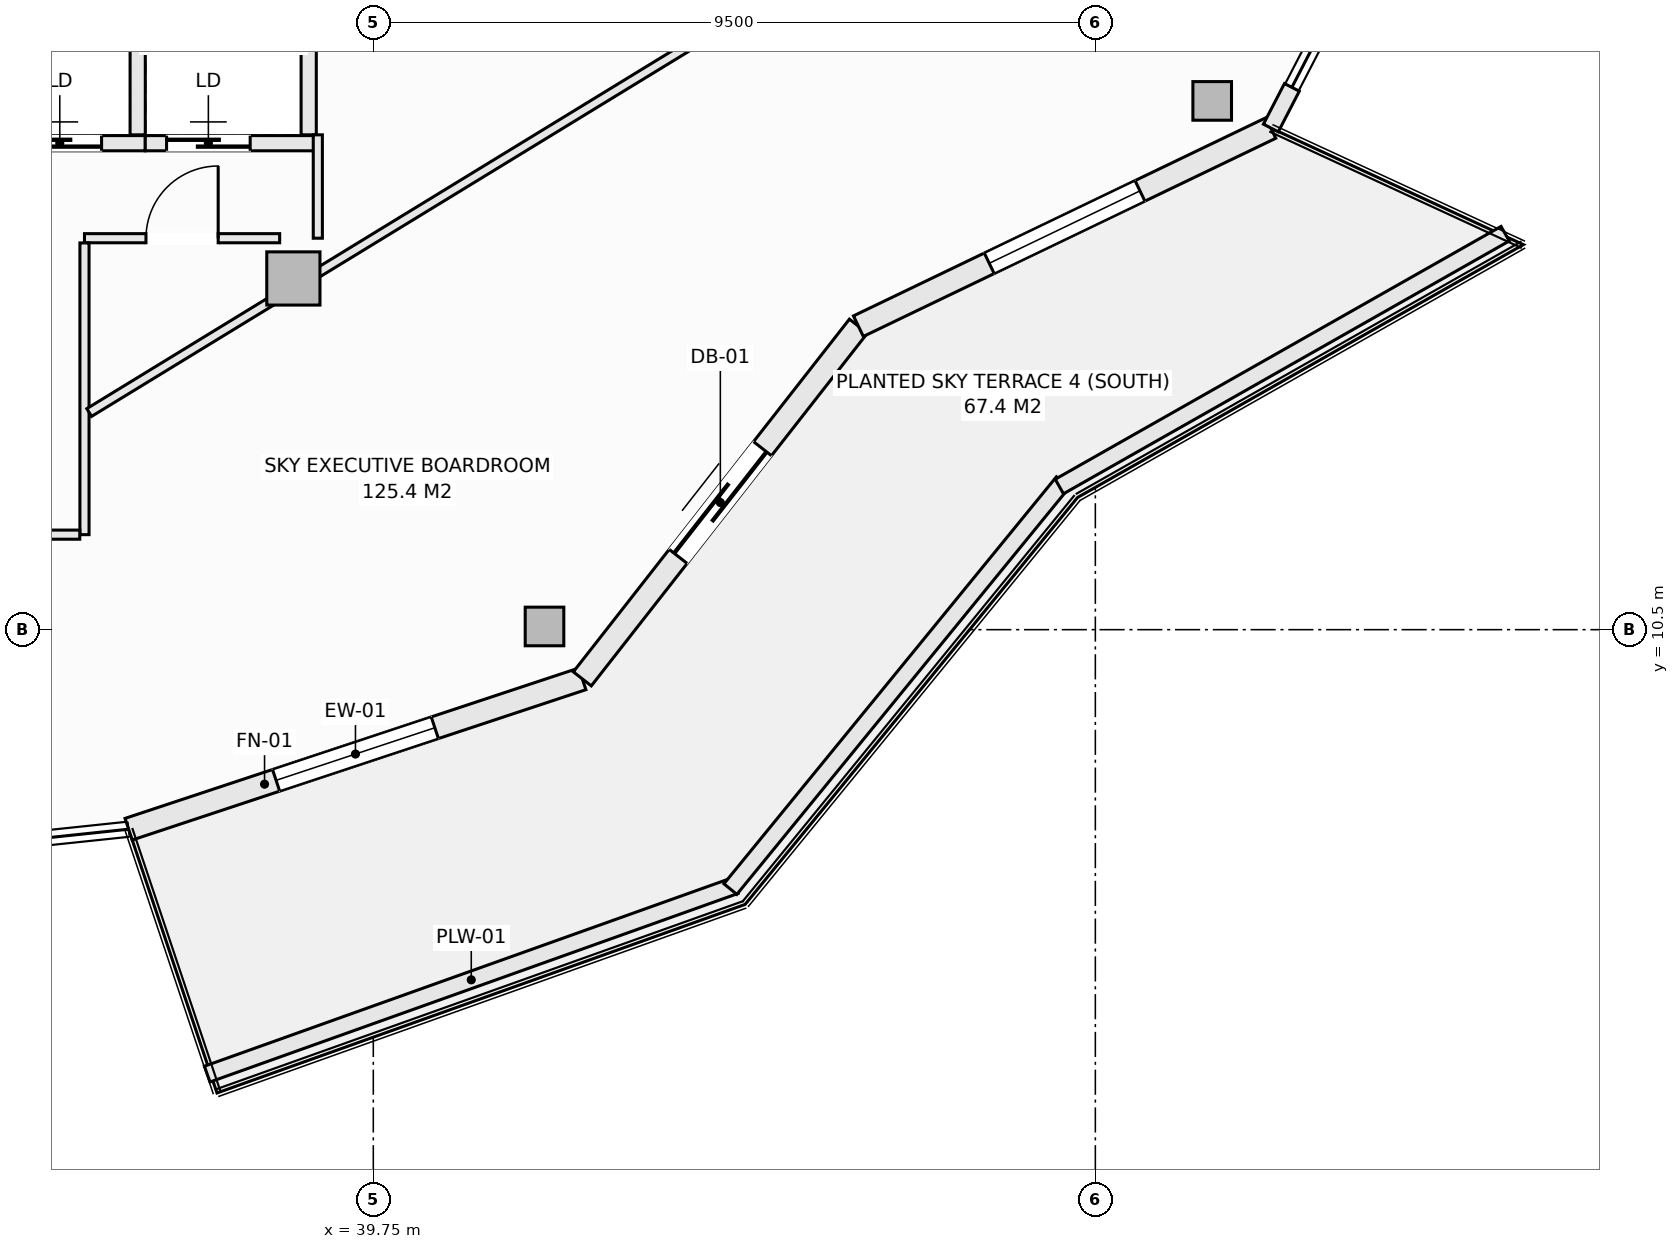
"""IFC4 building model, lengths in metres.
Left out: names, types, materials, properties, quantities, classifications, styles, units other than length and angle.
Written with IfcOpenShell. Run it as: python <this file> out.ifc"""

import sys

from ifc_helpers import new_model, si_unit, direction, frame, frame_2d, origin, origin_2d, place, context, subcontext, project, spatial, rectangle, hollow_rectangle, extrude, element, fill, save


model = new_model("IFC4")
c1 = context("Model", 3, precision=1e-05, world=origin(), true_north=direction((0.0, 1.0)))
c2 = subcontext(c1, "Body", "Model", "MODEL_VIEW")
j1 = project(units=[si_unit("LENGTHUNIT", "METRE"), si_unit("PLANEANGLEUNIT", "RADIAN")], contexts=[c1])
p1 = place(None, origin())
s1 = spatial("IfcSite", under=j1, at=p1, CompositionType="ELEMENT")
p2 = place(p1, origin())
s2 = spatial("IfcBuilding", under=s1, at=p2, CompositionType="ELEMENT")
p3 = place(p2, frame((0.0, 0.0, 191.9)))
s3 = spatial("IfcBuildingStorey", under=s2, at=p3, CompositionType="ELEMENT", Elevation=191.9)
for number, where, z_axis, x_axis in (
    (1, (42.003, 10.542, -0.28), (0.0, 0.0, 1.0), (1.0, 0.0, 0.0)),
    (2, (50.787, 17.456, -0.28), (0.0, 0.0, 1.0), (1.0, 0.0, 0.0)),
):
    element("IfcColumn", number, at=place(p3, frame(where, z_axis=z_axis, x_axis=x_axis)), inside=s3, PredefinedType="COLUMN", context=c2, shape_type="SweptSolid", body=[
        extrude(hollow_rectangle(XDim=0.508, YDim=0.508, WallThickness=0.019, at=origin_2d()), origin(), (0.0, 0.0, 1.0), 4.51),
    ])
p4 = place(p3, frame((38.698, 15.121, -0.28), z_axis=(0.0, 0.0, 1.0), x_axis=(1.0, 0.0, 0.0)))
e3 = element("IfcColumn", 3, at=p4, inside=s3, PredefinedType="COLUMN", context=c2, shape_type="SweptSolid", body=[
    extrude(rectangle(XDim=0.7, YDim=0.7, at=origin_2d()), origin(), (0.0, 0.0, 1.0), 4.51),
])
p5 = place(p3, frame((36.531, 7.875, 0.0), z_axis=(0.0, 0.0, 1.0), x_axis=(0.949240877604, 0.314550085495, 0.0)))
e4 = element("IfcWall", 4, at=p5, inside=s3, PredefinedType="SOLIDWALL", context=c2, shape_type="SweptSolid", body=[
    extrude(rectangle(XDim=6.288, YDim=0.3, at=frame_2d((3.144, 0.0))), origin(), (0.0, 0.0, 1.0), 3.805),
])
p6 = place(p5, frame((2.044, 0.0, 0.72)))
e5 = element("IfcOpeningElement", 5, at=p6, cuts=e4, PredefinedType="OPENING", context=c2, shape_type="SweptSolid", body=[
    extrude(rectangle(XDim=2.2, YDim=1.65, at=frame_2d((1.1, 0.825))), frame((0.0, 0.16, 0.0), z_axis=(0.0, -1.0, 0.0), x_axis=(1.0, 0.0, 0.0)), (0.0, 0.0, 1.0), 0.32),
])
p7 = place(p3, frame((42.5, 9.853, 0.0), z_axis=(0.0, 0.0, 1.0), x_axis=(0.616450126935, 0.787393955401, 0.0)))
e6 = element("IfcWall", 6, at=p7, inside=s3, PredefinedType="SOLIDWALL", context=c2, shape_type="SweptSolid", body=[
    extrude(rectangle(XDim=5.893, YDim=0.3, at=frame_2d((2.946, 0.0))), origin(), (0.0, 0.0, 1.0), 3.805),
])
p8 = place(p7, frame((2.046, 0.0, 0.0)))
e7 = element("IfcOpeningElement", 7, at=p8, cuts=e6, PredefinedType="OPENING", context=c2, shape_type="SweptSolid", body=[
    extrude(rectangle(XDim=1.8, YDim=2.25, at=frame_2d((0.9, 1.125))), frame((0.0, 0.16, 0.0), z_axis=(0.0, -1.0, 0.0), x_axis=(1.0, 0.0, 0.0)), (0.0, 0.0, 1.0), 0.32),
])
p9 = place(p3, frame((46.133, 14.493, 0.0), z_axis=(0.0, 0.0, 1.0), x_axis=(0.901348331142, 0.433094892545, 0.0)))
e8 = element("IfcWall", 8, at=p9, inside=s3, PredefinedType="SOLIDWALL", context=c2, shape_type="SweptSolid", body=[
    extrude(rectangle(XDim=6.021, YDim=0.3, at=frame_2d((3.01, 0.0))), origin(), (0.0, 0.0, 1.0), 3.805),
])
p10 = place(p9, frame((1.91, 0.0, 0.72)))
e9 = element("IfcOpeningElement", 9, at=p10, cuts=e8, PredefinedType="OPENING", context=c2, shape_type="SweptSolid", body=[
    extrude(rectangle(XDim=2.2, YDim=1.65, at=frame_2d((1.1, 0.825))), frame((0.0, 0.16, 0.0), z_axis=(0.0, -1.0, 0.0), x_axis=(1.0, 0.0, 0.0)), (0.0, 0.0, 1.0), 0.32),
])
p11 = place(p3, frame((51.559, 17.1, 0.0), z_axis=(0.0, 0.0, 1.0), x_axis=(0.459985611197, 0.887926369409, 0.0)))
e10 = element("IfcWall", 10, at=p11, inside=s3, PredefinedType="SOLIDWALL", context=c2, shape_type="SweptSolid", body=[
    extrude(rectangle(XDim=0.602, YDim=0.22, at=frame_2d((0.301, 0.0))), origin(), (0.0, 0.0, 1.0), 3.805),
])
p12 = place(p3, frame((37.565, 4.653, 0.0), z_axis=(0.0, 0.0, 1.0), x_axis=(0.941780086523, 0.336229488042, 0.0)))
e11 = element("IfcWall", 11, at=p12, inside=s3, PredefinedType="PARAPET", context=c2, shape_type="SweptSolid", body=[
    extrude(rectangle(XDim=7.378, YDim=0.22, at=frame_2d((3.689, 0.0))), origin(), (0.0, 0.0, 1.0), 0.52),
])
p13 = place(p3, frame((44.448, 7.087, 0.0), z_axis=(0.0, 0.0, 1.0), x_axis=(0.632697312147, 0.774399193699, 0.0)))
e12 = element("IfcWall", 12, at=p13, inside=s3, PredefinedType="PARAPET", context=c2, shape_type="SweptSolid", body=[
    extrude(rectangle(XDim=6.914, YDim=0.22, at=frame_2d((3.457, 0.0))), origin(), (0.0, 0.0, 1.0), 0.52),
])
p14 = place(p3, frame((48.776, 12.383, 0.0), z_axis=(0.0, 0.0, 1.0), x_axis=(0.869860619267, 0.493297580623, 0.0)))
e13 = element("IfcWall", 13, at=p14, inside=s3, PredefinedType="PARAPET", context=c2, shape_type="SweptSolid", body=[
    extrude(rectangle(XDim=6.743, YDim=0.22, at=frame_2d((3.371, 0.0))), origin(), (0.0, 0.0, 1.0), 0.52),
])
p15 = place(p3, frame((34.5, 16.9, 0.0), z_axis=(0.0, 0.0, 1.0), x_axis=(1.0, 0.0, 0.0)))
e14 = element("IfcWall", 14, at=p15, inside=s3, PredefinedType="SOLIDWALL", context=c2, shape_type="SweptSolid", body=[
    extrude(rectangle(XDim=2.25, YDim=0.2, at=frame_2d((1.125, 0.0))), origin(), (0.0, 0.0, 1.0), 4.23),
])
p16 = place(p15, frame((0.575, 0.0, 0.0)))
e15 = element("IfcOpeningElement", 15, at=p16, cuts=e14, PredefinedType="OPENING", context=c2, shape_type="SweptSolid", body=[
    extrude(rectangle(XDim=1.1, YDim=2.2, at=frame_2d((0.55, 1.1))), frame((0.0, 0.11, 0.0), z_axis=(0.0, -1.0, 0.0), x_axis=(1.0, 0.0, 0.0)), (0.0, 0.0, 1.0), 0.22),
])
p17 = place(p3, frame((36.65, 17.01, 0.0), z_axis=(0.0, 0.0, 1.0), x_axis=(0.0, 1.0, 0.0)))
e16 = element("IfcWall", 16, at=p17, inside=s3, PredefinedType="SOLIDWALL", context=c2, shape_type="SweptSolid", body=[
    extrude(rectangle(XDim=2.43, YDim=0.2, at=frame_2d((1.215, 0.0))), origin(), (0.0, 0.0, 1.0), 4.23),
])
p18 = place(p3, frame((36.75, 16.9, 0.0), z_axis=(0.0, 0.0, 1.0), x_axis=(1.0, 0.0, 0.0)))
e17 = element("IfcWall", 17, at=p18, inside=s3, PredefinedType="SOLIDWALL", context=c2, shape_type="SweptSolid", body=[
    extrude(rectangle(XDim=2.25, YDim=0.2, at=frame_2d((1.125, 0.0))), origin(), (0.0, 0.0, 1.0), 4.23),
])
p19 = place(p18, frame((0.28, 0.0, 0.0)))
e18 = element("IfcOpeningElement", 18, at=p19, cuts=e17, PredefinedType="OPENING", context=c2, shape_type="SweptSolid", body=[
    extrude(rectangle(XDim=1.1, YDim=2.2, at=frame_2d((0.55, 1.1))), frame((0.0, 0.11, 0.0), z_axis=(0.0, -1.0, 0.0), x_axis=(1.0, 0.0, 0.0)), (0.0, 0.0, 1.0), 0.22),
])
p20 = place(p3, frame((38.9, 17.01, 0.0), z_axis=(0.0, 0.0, 1.0), x_axis=(0.0, 1.0, 0.0)))
e19 = element("IfcWall", 19, at=p20, inside=s3, PredefinedType="SOLIDWALL", context=c2, shape_type="SweptSolid", body=[
    extrude(rectangle(XDim=2.43, YDim=0.2, at=frame_2d((1.215, 0.0))), origin(), (0.0, 0.0, 1.0), 4.23),
])
p21 = place(p3, frame((39.02, 15.65, 0.0), z_axis=(0.0, 0.0, 1.0), x_axis=(0.0, 1.0, 0.0)))
e20 = element("IfcWall", 20, at=p21, inside=s3, PredefinedType="PARTITIONING", context=c2, shape_type="SweptSolid", body=[
    extrude(rectangle(XDim=1.36, YDim=0.12, at=frame_2d((0.68, 0.0))), origin(), (0.0, 0.0, 1.0), 3.678),
])
p22 = place(p3, frame((35.95, 15.65, 0.0), z_axis=(0.0, 0.0, 1.0), x_axis=(1.0, 0.0, 0.0)))
e21 = element("IfcWall", 21, at=p22, inside=s3, PredefinedType="PARTITIONING", context=c2, shape_type="SweptSolid", body=[
    extrude(rectangle(XDim=2.568, YDim=0.12, at=frame_2d((1.284, 0.0))), origin(), (0.0, 0.0, 1.0), 4.23),
])
p23 = place(p22, frame((0.809, 0.0, 0.0)))
e22 = element("IfcOpeningElement", 22, at=p23, cuts=e21, PredefinedType="OPENING", context=c2, shape_type="SweptSolid", body=[
    extrude(rectangle(XDim=0.95, YDim=2.1, at=frame_2d((0.475, 1.05))), frame((0.0, 0.07, 0.0), z_axis=(0.0, -1.0, 0.0), x_axis=(1.0, 0.0, 0.0)), (0.0, 0.0, 1.0), 0.14),
])
p24 = place(p3, frame((35.95, 11.75, 0.0), z_axis=(0.0, 0.0, 1.0), x_axis=(0.0, 1.0, 0.0)))
e23 = element("IfcWall", 23, at=p24, inside=s3, PredefinedType="PARTITIONING", context=c2, shape_type="SweptSolid", body=[
    extrude(rectangle(XDim=3.838, YDim=0.12, at=frame_2d((1.919, 0.0))), origin(), (0.0, 0.0, 1.0), 4.23),
])
p25 = place(p3, frame((27.212, 11.75, 0.0), z_axis=(0.0, 0.0, 1.0), x_axis=(1.0, 0.0, 0.0)))
e24 = element("IfcWall", 24, at=p25, inside=s3, PredefinedType="PARTITIONING", context=c2, shape_type="SweptSolid", body=[
    extrude(rectangle(XDim=8.676, YDim=0.12, at=frame_2d((4.338, 0.0))), origin(), (0.0, 0.0, 1.0), 4.23),
])
p26 = place(p25, frame((2.926, 0.0, 0.0)))
e25 = element("IfcOpeningElement", 25, at=p26, cuts=e24, PredefinedType="OPENING", context=c2, shape_type="SweptSolid", body=[
    extrude(rectangle(XDim=0.95, YDim=2.1, at=frame_2d((0.475, 1.05))), frame((0.0, 0.07, 0.0), z_axis=(0.0, -1.0, 0.0), x_axis=(1.0, 0.0, 0.0)), (0.0, 0.0, 1.0), 0.14),
])
p27 = place(p25, frame((6.633, 0.0, 0.0)))
e26 = element("IfcOpeningElement", 26, at=p27, cuts=e24, PredefinedType="OPENING", context=c2, shape_type="SweptSolid", body=[
    extrude(rectangle(XDim=0.95, YDim=2.1, at=frame_2d((0.475, 1.05))), frame((0.0, 0.07, 0.0), z_axis=(0.0, -1.0, 0.0), x_axis=(1.0, 0.0, 0.0)), (0.0, 0.0, 1.0), 0.14),
])
p28 = place(p3, frame((36.012, 13.357, 0.0), z_axis=(0.0, 0.0, 1.0), x_axis=(0.853236403134, 0.521524343024, 0.0)))
e27 = element("IfcWall", 27, at=p28, inside=s3, PredefinedType="PARTITIONING", context=c2, shape_type="SweptSolid", body=[
    extrude(rectangle(XDim=18.599, YDim=0.12, at=frame_2d((9.299, 0.0))), origin(), (0.0, 0.0, 1.0), 3.678),
])
p29 = place(p6, origin())
e28 = element("IfcWindow", 28, at=p29, inside=s3, PartitioningType="SINGLE_PANEL", PredefinedType="WINDOW", context=c2, shape_type="SweptSolid", body=[
    extrude(rectangle(XDim=2.2, YDim=1.65, at=frame_2d((1.1, 0.825))), frame((0.0, 0.03, 0.0), z_axis=(0.0, -1.0, 0.0), x_axis=(1.0, 0.0, 0.0)), (0.0, 0.0, 1.0), 0.06),
])
fill(e5, e28)
p30 = place(p8, frame((1.8, 0.0, 0.0), z_axis=(0.0, 0.0, 1.0), x_axis=(-1.0, 0.0, 0.0)))
e29 = element("IfcDoor", 29, at=p30, inside=s3, OperationType="SLIDING_TO_LEFT", PredefinedType="DOOR", context=c2, shape_type="SweptSolid", body=[
    extrude(rectangle(XDim=1.8, YDim=2.25, at=frame_2d((0.9, 1.125))), frame((0.0, 0.025, 0.0), z_axis=(0.0, -1.0, 0.0), x_axis=(1.0, 0.0, 0.0)), (0.0, 0.0, 1.0), 0.05),
])
fill(e7, e29)
p31 = place(p10, origin())
e30 = element("IfcWindow", 30, at=p31, inside=s3, PartitioningType="SINGLE_PANEL", PredefinedType="WINDOW", context=c2, shape_type="SweptSolid", body=[
    extrude(rectangle(XDim=2.2, YDim=1.65, at=frame_2d((1.1, 0.825))), frame((0.0, 0.03, 0.0), z_axis=(0.0, -1.0, 0.0), x_axis=(1.0, 0.0, 0.0)), (0.0, 0.0, 1.0), 0.06),
])
fill(e9, e30)
p32 = place(p16, origin())
e31 = element("IfcDoor", 31, at=p32, inside=s3, OperationType="SLIDING_TO_LEFT", PredefinedType="DOOR", context=c2, shape_type="SweptSolid", body=[
    extrude(rectangle(XDim=1.1, YDim=2.2, at=frame_2d((0.55, 1.1))), frame((0.0, 0.025, 0.0), z_axis=(0.0, -1.0, 0.0), x_axis=(1.0, 0.0, 0.0)), (0.0, 0.0, 1.0), 0.05),
])
fill(e15, e31)
p33 = place(p19, origin())
e32 = element("IfcDoor", 32, at=p33, inside=s3, OperationType="SLIDING_TO_LEFT", PredefinedType="DOOR", context=c2, shape_type="SweptSolid", body=[
    extrude(rectangle(XDim=1.1, YDim=2.2, at=frame_2d((0.55, 1.1))), frame((0.0, 0.025, 0.0), z_axis=(0.0, -1.0, 0.0), x_axis=(1.0, 0.0, 0.0)), (0.0, 0.0, 1.0), 0.05),
])
fill(e18, e32)
p34 = place(p23, origin())
e33 = element("IfcDoor", 33, at=p34, inside=s3, OperationType="SINGLE_SWING_RIGHT", PredefinedType="DOOR", context=c2, shape_type="SweptSolid", body=[
    extrude(rectangle(XDim=0.95, YDim=2.1, at=frame_2d((0.475, 1.05))), frame((0.0, 0.025, 0.0), z_axis=(0.0, -1.0, 0.0), x_axis=(1.0, 0.0, 0.0)), (0.0, 0.0, 1.0), 0.05),
])
fill(e22, e33)
save(model, sys.argv[1])
